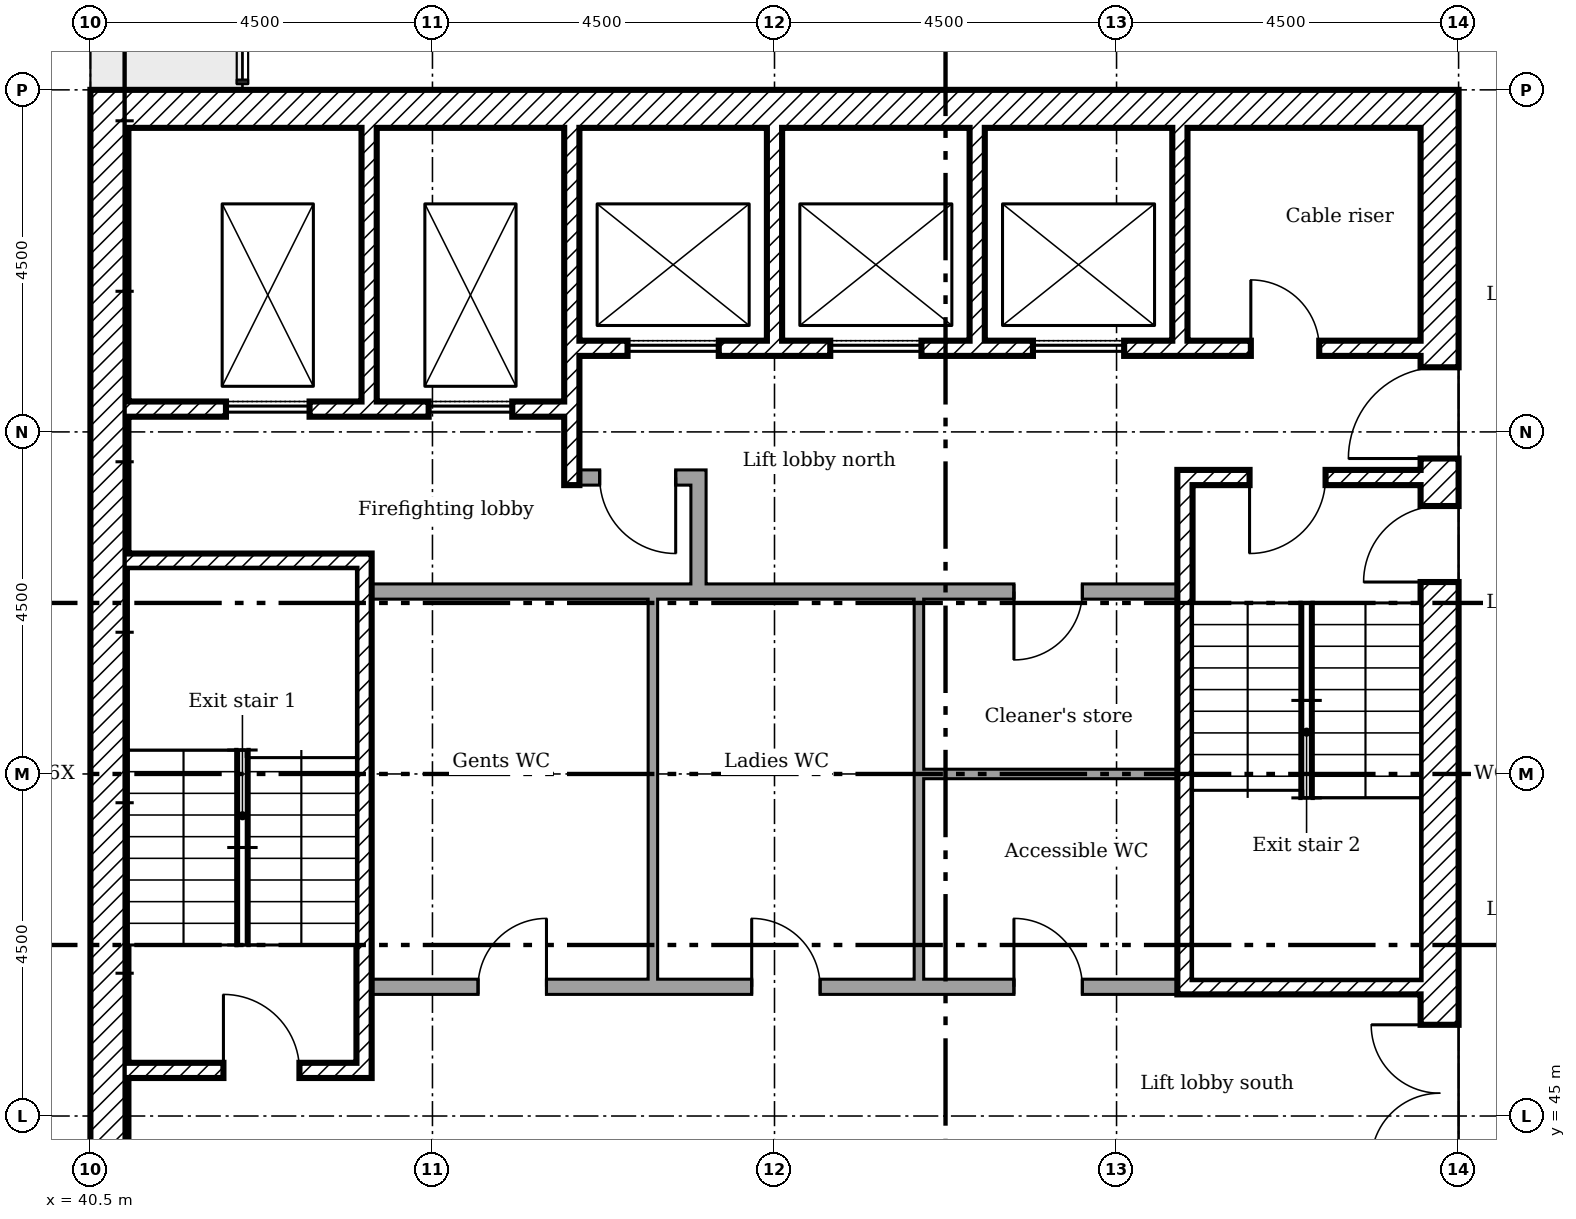
"""IFC4 building model, lengths in metres.
Left out: names, types, materials, properties, quantities, classifications, styles, units other than length and angle.
Written with IfcOpenShell. Run it as: python <this file> out.ifc"""

import sys

from ifc_helpers import new_model, si_unit, direction, frame, frame_2d, origin, place, context, subcontext, project, spatial, rectangle, extrude, element, fill, save


model = new_model("IFC4")
c1 = context("Model", 3, precision=1e-05, world=origin(), true_north=direction((0.0, 1.0)))
c2 = subcontext(c1, "Body", "Model", "MODEL_VIEW")
j1 = project(units=[si_unit("LENGTHUNIT", "METRE"), si_unit("PLANEANGLEUNIT", "RADIAN")], contexts=[c1])
p1 = place(None, origin())
s1 = spatial("IfcSite", under=j1, at=p1, CompositionType="ELEMENT")
p2 = place(p1, origin())
s2 = spatial("IfcBuilding", under=s1, at=p2, CompositionType="ELEMENT")
p3 = place(p2, frame((0.0, 0.0, 213.6)))
s3 = spatial("IfcBuildingStorey", under=s2, at=p3, CompositionType="ELEMENT", Elevation=213.6)
p4 = place(p3, frame((58.25, 40.5, 0.0), z_axis=(0.0, 0.0, 1.0), x_axis=(0.0, 1.0, 0.0)))
e1 = element("IfcWall", 1, at=p4, inside=s3, PredefinedType="SHEAR", context=c2, shape_type="SweptSolid", body=[
    extrude(rectangle(XDim=18.0, YDim=0.5, at=frame_2d((9.0, 0.0))), origin(), (0.0, 0.0, 1.0), 3.35),
])
p5 = place(p4, frame((13.15, 0.0, 0.0)))
e2 = element("IfcOpeningElement", 2, at=p5, cuts=e1, PredefinedType="OPENING", context=c2, shape_type="SweptSolid", body=[
    extrude(rectangle(XDim=1.2, YDim=2.1, at=frame_2d((0.6, 1.05))), frame((0.0, 0.26, 0.0), z_axis=(0.0, -1.0, 0.0), x_axis=(1.0, 0.0, 0.0)), (0.0, 0.0, 1.0), 0.52),
])
p6 = place(p4, frame((3.9, 0.0, 0.0)))
e3 = element("IfcOpeningElement", 3, at=p6, cuts=e1, PredefinedType="OPENING", context=c2, shape_type="SweptSolid", body=[
    extrude(rectangle(XDim=1.8, YDim=2.1, at=frame_2d((0.9, 1.05))), frame((0.0, 0.26, 0.0), z_axis=(0.0, -1.0, 0.0), x_axis=(1.0, 0.0, 0.0)), (0.0, 0.0, 1.0), 0.52),
])
p7 = place(p4, frame((11.525, 0.0, 0.0)))
e4 = element("IfcOpeningElement", 4, at=p7, cuts=e1, PredefinedType="OPENING", context=c2, shape_type="SweptSolid", body=[
    extrude(rectangle(XDim=1.0, YDim=2.1, at=frame_2d((0.5, 1.05))), frame((0.0, 0.26, 0.0), z_axis=(0.0, -1.0, 0.0), x_axis=(1.0, 0.0, 0.0)), (0.0, 0.0, 1.0), 0.52),
])
p8 = place(p3, frame((40.5, 58.25, 0.0)))
e5 = element("IfcWall", 5, at=p8, inside=s3, PredefinedType="SHEAR", context=c2, shape_type="SweptSolid", body=[
    extrude(rectangle(XDim=17.5, YDim=0.5, at=frame_2d((8.75, 0.0))), origin(), (0.0, 0.0, 1.0), 3.35),
])
p9 = place(p3, frame((40.75, 41.0, 0.0), z_axis=(0.0, 0.0, 1.0), x_axis=(0.0, 1.0, 0.0)))
e6 = element("IfcWall", 6, at=p9, inside=s3, PredefinedType="SHEAR", context=c2, shape_type="SweptSolid", body=[
    extrude(rectangle(XDim=17.0, YDim=0.5, at=frame_2d((8.5, 0.0))), origin(), (0.0, 0.0, 1.0), 3.35),
])
p10 = place(p3, frame((44.167, 58.0, 0.0), z_axis=(0.0, 0.0, 1.0), x_axis=(0.0, -1.0, 0.0)))
e7 = element("IfcWall", 7, at=p10, inside=s3, PredefinedType="SHEAR", context=c2, shape_type="SweptSolid", body=[
    extrude(rectangle(XDim=3.6, YDim=0.2, at=frame_2d((1.8, 0.0))), origin(), (0.0, 0.0, 1.0), 3.35),
])
p11 = place(p3, frame((46.833, 58.0, 0.0), z_axis=(0.0, 0.0, 1.0), x_axis=(0.0, -1.0, 0.0)))
e8 = element("IfcWall", 8, at=p11, inside=s3, PredefinedType="SHEAR", context=c2, shape_type="SweptSolid", body=[
    extrude(rectangle(XDim=4.7, YDim=0.2, at=frame_2d((2.35, 0.0))), origin(), (0.0, 0.0, 1.0), 3.35),
])
for number, where, z_axis, x_axis in (
    (9, (49.5, 58.0, 0.0), (0.0, 0.0, 1.0), (0.0, -1.0, 0.0)),
    (10, (52.167, 58.0, 0.0), (0.0, 0.0, 1.0), (0.0, -1.0, 0.0)),
    (11, (54.833, 58.0, 0.0), (0.0, 0.0, 1.0), (0.0, -1.0, 0.0)),
):
    element("IfcWall", number, at=place(p3, frame(where, z_axis=z_axis, x_axis=x_axis)), inside=s3, PredefinedType="SHEAR", context=c2, shape_type="SweptSolid", body=[
        extrude(rectangle(XDim=2.8, YDim=0.2, at=frame_2d((1.4, 0.0))), origin(), (0.0, 0.0, 1.0), 3.35),
    ])
p12 = place(p3, frame((48.5, 51.9, 0.0), z_axis=(0.0, 0.0, 1.0), x_axis=(0.0, 1.0, 0.0)))
e12 = element("IfcWall", 12, at=p12, inside=s3, PredefinedType="PARTITIONING", context=c2, shape_type="SweptSolid", body=[
    extrude(rectangle(XDim=1.6, YDim=0.2, at=frame_2d((0.8, 0.0))), origin(), (0.0, 0.0, 1.0), 3.35),
])
p13 = place(p3, frame((46.933, 53.4, 0.0)))
e13 = element("IfcWall", 13, at=p13, inside=s3, PredefinedType="PARTITIONING", context=c2, shape_type="SweptSolid", body=[
    extrude(rectangle(XDim=1.467, YDim=0.2, at=frame_2d((0.733, 0.0))), origin(), (0.0, 0.0, 1.0), 3.35),
])
p14 = place(p13, frame((0.267, 0.0, 0.0)))
e14 = element("IfcOpeningElement", 14, at=p14, cuts=e13, PredefinedType="OPENING", context=c2, shape_type="SweptSolid", body=[
    extrude(rectangle(XDim=1.0, YDim=2.1, at=frame_2d((0.5, 1.05))), frame((0.0, 0.11, 0.0), z_axis=(0.0, -1.0, 0.0), x_axis=(1.0, 0.0, 0.0)), (0.0, 0.0, 1.0), 0.22),
])
p15 = place(p3, frame((46.933, 55.1, 0.0)))
e15 = element("IfcWall", 15, at=p15, inside=s3, PredefinedType="SHEAR", context=c2, shape_type="SweptSolid", body=[
    extrude(rectangle(XDim=11.067, YDim=0.2, at=frame_2d((5.533, 0.0))), origin(), (0.0, 0.0, 1.0), 3.35),
])
p16 = place(p15, frame((8.833, 0.0, 0.0)))
e16 = element("IfcOpeningElement", 16, at=p16, cuts=e15, PredefinedType="OPENING", context=c2, shape_type="SweptSolid", body=[
    extrude(rectangle(XDim=0.9, YDim=2.1, at=frame_2d((0.45, 1.05))), frame((0.0, 0.11, 0.0), z_axis=(0.0, -1.0, 0.0), x_axis=(1.0, 0.0, 0.0)), (0.0, 0.0, 1.0), 0.22),
])
p17 = place(p15, frame((0.633, 0.0, 0.0)))
e17 = element("IfcOpeningElement", 17, at=p17, cuts=e15, PredefinedType="OPENING", context=c2, shape_type="SweptSolid", body=[
    extrude(rectangle(XDim=1.2, YDim=2.1, at=frame_2d((0.6, 1.05))), frame((0.0, 0.11, 0.0), z_axis=(0.0, -1.0, 0.0), x_axis=(1.0, 0.0, 0.0)), (0.0, 0.0, 1.0), 0.22),
])
p18 = place(p15, frame((3.3, 0.0, 0.0)))
e18 = element("IfcOpeningElement", 18, at=p18, cuts=e15, PredefinedType="OPENING", context=c2, shape_type="SweptSolid", body=[
    extrude(rectangle(XDim=1.2, YDim=2.1, at=frame_2d((0.6, 1.05))), frame((0.0, 0.11, 0.0), z_axis=(0.0, -1.0, 0.0), x_axis=(1.0, 0.0, 0.0)), (0.0, 0.0, 1.0), 0.22),
])
p19 = place(p15, frame((5.967, 0.0, 0.0)))
e19 = element("IfcOpeningElement", 19, at=p19, cuts=e15, PredefinedType="OPENING", context=c2, shape_type="SweptSolid", body=[
    extrude(rectangle(XDim=1.2, YDim=2.1, at=frame_2d((0.6, 1.05))), frame((0.0, 0.11, 0.0), z_axis=(0.0, -1.0, 0.0), x_axis=(1.0, 0.0, 0.0)), (0.0, 0.0, 1.0), 0.22),
])
p20 = place(p3, frame((41.0, 54.3, 0.0)))
e20 = element("IfcWall", 20, at=p20, inside=s3, PredefinedType="SHEAR", context=c2, shape_type="SweptSolid", body=[
    extrude(rectangle(XDim=5.733, YDim=0.2, at=frame_2d((2.867, 0.0))), origin(), (0.0, 0.0, 1.0), 3.35),
])
p21 = place(p20, frame((1.283, 0.0, 0.0)))
e21 = element("IfcOpeningElement", 21, at=p21, cuts=e20, PredefinedType="OPENING", context=c2, shape_type="SweptSolid", body=[
    extrude(rectangle(XDim=1.1, YDim=2.1, at=frame_2d((0.55, 1.05))), frame((0.0, 0.11, 0.0), z_axis=(0.0, -1.0, 0.0), x_axis=(1.0, 0.0, 0.0)), (0.0, 0.0, 1.0), 0.22),
])
p22 = place(p20, frame((3.95, 0.0, 0.0)))
e22 = element("IfcOpeningElement", 22, at=p22, cuts=e20, PredefinedType="OPENING", context=c2, shape_type="SweptSolid", body=[
    extrude(rectangle(XDim=1.1, YDim=2.1, at=frame_2d((0.55, 1.05))), frame((0.0, 0.11, 0.0), z_axis=(0.0, -1.0, 0.0), x_axis=(1.0, 0.0, 0.0)), (0.0, 0.0, 1.0), 0.22),
])
p23 = place(p3, frame((44.1, 45.5, 0.0), z_axis=(0.0, 0.0, 1.0), x_axis=(0.0, 1.0, 0.0)))
e23 = element("IfcWall", 23, at=p23, inside=s3, PredefinedType="SHEAR", context=c2, shape_type="SweptSolid", body=[
    extrude(rectangle(XDim=6.9, YDim=0.2, at=frame_2d((3.45, 0.0))), origin(), (0.0, 0.0, 1.0), 3.35),
])
p24 = place(p3, frame((41.0, 52.3, 0.0)))
e24 = element("IfcWall", 24, at=p24, inside=s3, PredefinedType="SHEAR", context=c2, shape_type="SweptSolid", body=[
    extrude(rectangle(XDim=3.0, YDim=0.2, at=frame_2d((1.5, 0.0))), origin(), (0.0, 0.0, 1.0), 3.35),
])
p25 = place(p3, frame((41.0, 45.6, 0.0)))
e25 = element("IfcWall", 25, at=p25, inside=s3, PredefinedType="SHEAR", context=c2, shape_type="SweptSolid", body=[
    extrude(rectangle(XDim=3.0, YDim=0.2, at=frame_2d((1.5, 0.0))), origin(), (0.0, 0.0, 1.0), 3.35),
])
p26 = place(p25, frame((1.25, 0.0, 0.0)))
e26 = element("IfcOpeningElement", 26, at=p26, cuts=e25, PredefinedType="OPENING", context=c2, shape_type="SweptSolid", body=[
    extrude(rectangle(XDim=1.0, YDim=2.1, at=frame_2d((0.5, 1.05))), frame((0.0, 0.11, 0.0), z_axis=(0.0, -1.0, 0.0), x_axis=(1.0, 0.0, 0.0)), (0.0, 0.0, 1.0), 0.22),
])
p27 = place(p3, frame((54.8, 53.4, 0.0)))
e27 = element("IfcWall", 27, at=p27, inside=s3, PredefinedType="SHEAR", context=c2, shape_type="SweptSolid", body=[
    extrude(rectangle(XDim=3.2, YDim=0.2, at=frame_2d((1.6, 0.0))), origin(), (0.0, 0.0, 1.0), 3.35),
])
p28 = place(p27, frame((0.95, 0.0, 0.0)))
e28 = element("IfcOpeningElement", 28, at=p28, cuts=e27, PredefinedType="OPENING", context=c2, shape_type="SweptSolid", body=[
    extrude(rectangle(XDim=1.0, YDim=2.1, at=frame_2d((0.5, 1.05))), frame((0.0, 0.11, 0.0), z_axis=(0.0, -1.0, 0.0), x_axis=(1.0, 0.0, 0.0)), (0.0, 0.0, 1.0), 0.22),
])
p29 = place(p3, frame((54.8, 46.7, 0.0)))
e29 = element("IfcWall", 29, at=p29, inside=s3, PredefinedType="SHEAR", context=c2, shape_type="SweptSolid", body=[
    extrude(rectangle(XDim=3.2, YDim=0.2, at=frame_2d((1.6, 0.0))), origin(), (0.0, 0.0, 1.0), 3.35),
])
p30 = place(p3, frame((54.9, 46.8, 0.0), z_axis=(0.0, 0.0, 1.0), x_axis=(0.0, 1.0, 0.0)))
e30 = element("IfcWall", 30, at=p30, inside=s3, PredefinedType="SHEAR", context=c2, shape_type="SweptSolid", body=[
    extrude(rectangle(XDim=6.5, YDim=0.2, at=frame_2d((3.25, 0.0))), origin(), (0.0, 0.0, 1.0), 3.35),
])
p31 = place(p3, frame((44.2, 51.9, 0.0)))
e31 = element("IfcWall", 31, at=p31, inside=s3, PredefinedType="PARTITIONING", context=c2, shape_type="SweptSolid", body=[
    extrude(rectangle(XDim=10.6, YDim=0.2, at=frame_2d((5.3, 0.0))), origin(), (0.0, 0.0, 1.0), 3.35),
])
p32 = place(p31, frame((8.45, 0.0, 0.0)))
e32 = element("IfcOpeningElement", 32, at=p32, cuts=e31, PredefinedType="OPENING", context=c2, shape_type="SweptSolid", body=[
    extrude(rectangle(XDim=0.9, YDim=2.1, at=frame_2d((0.45, 1.05))), frame((0.0, 0.11, 0.0), z_axis=(0.0, -1.0, 0.0), x_axis=(1.0, 0.0, 0.0)), (0.0, 0.0, 1.0), 0.22),
])
p33 = place(p3, frame((44.2, 46.7, 0.0)))
e33 = element("IfcWall", 33, at=p33, inside=s3, PredefinedType="PARTITIONING", context=c2, shape_type="SweptSolid", body=[
    extrude(rectangle(XDim=10.6, YDim=0.2, at=frame_2d((5.3, 0.0))), origin(), (0.0, 0.0, 1.0), 3.35),
])
p34 = place(p33, frame((1.4, 0.0, 0.0)))
e34 = element("IfcOpeningElement", 34, at=p34, cuts=e33, PredefinedType="OPENING", context=c2, shape_type="SweptSolid", body=[
    extrude(rectangle(XDim=0.9, YDim=2.1, at=frame_2d((0.45, 1.05))), frame((0.0, 0.11, 0.0), z_axis=(0.0, -1.0, 0.0), x_axis=(1.0, 0.0, 0.0)), (0.0, 0.0, 1.0), 0.22),
])
p35 = place(p33, frame((5.0, 0.0, 0.0)))
e35 = element("IfcOpeningElement", 35, at=p35, cuts=e33, PredefinedType="OPENING", context=c2, shape_type="SweptSolid", body=[
    extrude(rectangle(XDim=0.9, YDim=2.1, at=frame_2d((0.45, 1.05))), frame((0.0, 0.11, 0.0), z_axis=(0.0, -1.0, 0.0), x_axis=(1.0, 0.0, 0.0)), (0.0, 0.0, 1.0), 0.22),
])
p36 = place(p33, frame((8.45, 0.0, 0.0)))
e36 = element("IfcOpeningElement", 36, at=p36, cuts=e33, PredefinedType="OPENING", context=c2, shape_type="SweptSolid", body=[
    extrude(rectangle(XDim=0.9, YDim=2.1, at=frame_2d((0.45, 1.05))), frame((0.0, 0.11, 0.0), z_axis=(0.0, -1.0, 0.0), x_axis=(1.0, 0.0, 0.0)), (0.0, 0.0, 1.0), 0.22),
])
p37 = place(p3, frame((47.9, 46.8, 0.0), z_axis=(0.0, 0.0, 1.0), x_axis=(0.0, 1.0, 0.0)))
e37 = element("IfcWall", 37, at=p37, inside=s3, PredefinedType="PARTITIONING", context=c2, shape_type="SweptSolid", body=[
    extrude(rectangle(XDim=5.0, YDim=0.125, at=frame_2d((2.5, 0.0))), origin(), (0.0, 0.0, 1.0), 3.35),
])
p38 = place(p3, frame((51.4, 46.8, 0.0), z_axis=(0.0, 0.0, 1.0), x_axis=(0.0, 1.0, 0.0)))
e38 = element("IfcWall", 38, at=p38, inside=s3, PredefinedType="PARTITIONING", context=c2, shape_type="SweptSolid", body=[
    extrude(rectangle(XDim=2.762, YDim=0.125, at=frame_2d((1.381, 0.0))), origin(), (0.0, 0.0, 1.0), 3.35),
])
p39 = place(p3, frame((54.8, 49.5, 0.0), z_axis=(0.0, 0.0, 1.0), x_axis=(-1.0, 0.0, 0.0)))
e39 = element("IfcWall", 39, at=p39, inside=s3, PredefinedType="PARTITIONING", context=c2, shape_type="SweptSolid", body=[
    extrude(rectangle(XDim=3.338, YDim=0.125, at=frame_2d((1.669, 0.0))), origin(), (0.0, 0.0, 1.0), 3.35),
])
p40 = place(p3, frame((51.4, 49.5, 0.0), z_axis=(0.0, 0.0, 1.0), x_axis=(0.0, 1.0, 0.0)))
e40 = element("IfcWall", 40, at=p40, inside=s3, PredefinedType="PARTITIONING", context=c2, shape_type="SweptSolid", body=[
    extrude(rectangle(XDim=2.3, YDim=0.125, at=frame_2d((1.15, 0.0))), origin(), (0.0, 0.0, 1.0), 3.35),
])
p41 = place(p5, origin())
e41 = element("IfcDoor", 41, at=p41, inside=s3, OperationType="SINGLE_SWING_RIGHT", PredefinedType="DOOR", context=c2, shape_type="SweptSolid", body=[
    extrude(rectangle(XDim=1.2, YDim=2.1, at=frame_2d((0.6, 1.05))), frame((0.0, 0.025, 0.0), z_axis=(0.0, -1.0, 0.0), x_axis=(1.0, 0.0, 0.0)), (0.0, 0.0, 1.0), 0.05),
])
fill(e2, e41)
p42 = place(p6, origin())
e42 = element("IfcDoor", 42, at=p42, inside=s3, OperationType="DOUBLE_DOOR_SINGLE_SWING", PredefinedType="DOOR", context=c2, shape_type="SweptSolid", body=[
    extrude(rectangle(XDim=1.8, YDim=2.1, at=frame_2d((0.9, 1.05))), frame((0.0, 0.025, 0.0), z_axis=(0.0, -1.0, 0.0), x_axis=(1.0, 0.0, 0.0)), (0.0, 0.0, 1.0), 0.05),
])
fill(e3, e42)
p43 = place(p26, origin())
e43 = element("IfcDoor", 43, at=p43, inside=s3, OperationType="SINGLE_SWING_RIGHT", PredefinedType="DOOR", context=c2, shape_type="SweptSolid", body=[
    extrude(rectangle(XDim=1.0, YDim=2.1, at=frame_2d((0.5, 1.05))), frame((0.0, 0.025, 0.0), z_axis=(0.0, -1.0, 0.0), x_axis=(1.0, 0.0, 0.0)), (0.0, 0.0, 1.0), 0.05),
])
fill(e26, e43)
p44 = place(p28, frame((1.0, 0.0, 0.0), x_axis=(-1.0, 0.0, 0.0)))
e44 = element("IfcDoor", 44, at=p44, inside=s3, OperationType="SINGLE_SWING_LEFT", PredefinedType="DOOR", context=c2, shape_type="SweptSolid", body=[
    extrude(rectangle(XDim=1.0, YDim=2.1, at=frame_2d((0.5, 1.05))), frame((0.0, 0.025, 0.0), z_axis=(0.0, -1.0, 0.0), x_axis=(1.0, 0.0, 0.0)), (0.0, 0.0, 1.0), 0.05),
])
fill(e28, e44)
p45 = place(p7, origin())
e45 = element("IfcDoor", 45, at=p45, inside=s3, OperationType="SINGLE_SWING_RIGHT", PredefinedType="DOOR", context=c2, shape_type="SweptSolid", body=[
    extrude(rectangle(XDim=1.0, YDim=2.1, at=frame_2d((0.5, 1.05))), frame((0.0, 0.025, 0.0), z_axis=(0.0, -1.0, 0.0), x_axis=(1.0, 0.0, 0.0)), (0.0, 0.0, 1.0), 0.05),
])
fill(e4, e45)
p46 = place(p14, frame((1.0, 0.0, 0.0), x_axis=(-1.0, 0.0, 0.0)))
e46 = element("IfcDoor", 46, at=p46, inside=s3, OperationType="SINGLE_SWING_RIGHT", PredefinedType="DOOR", context=c2, shape_type="SweptSolid", body=[
    extrude(rectangle(XDim=1.0, YDim=2.1, at=frame_2d((0.5, 1.05))), frame((0.0, 0.025, 0.0), z_axis=(0.0, -1.0, 0.0), x_axis=(1.0, 0.0, 0.0)), (0.0, 0.0, 1.0), 0.05),
])
fill(e14, e46)
p47 = place(p16, origin())
e47 = element("IfcDoor", 47, at=p47, inside=s3, OperationType="SINGLE_SWING_RIGHT", PredefinedType="DOOR", context=c2, shape_type="SweptSolid", body=[
    extrude(rectangle(XDim=0.9, YDim=2.1, at=frame_2d((0.45, 1.05))), frame((0.0, 0.025, 0.0), z_axis=(0.0, -1.0, 0.0), x_axis=(1.0, 0.0, 0.0)), (0.0, 0.0, 1.0), 0.05),
])
fill(e16, e47)
p48 = place(p34, origin())
e48 = element("IfcDoor", 48, at=p48, inside=s3, OperationType="SINGLE_SWING_LEFT", PredefinedType="DOOR", context=c2, shape_type="SweptSolid", body=[
    extrude(rectangle(XDim=0.9, YDim=2.1, at=frame_2d((0.45, 1.05))), frame((0.0, 0.025, 0.0), z_axis=(0.0, -1.0, 0.0), x_axis=(1.0, 0.0, 0.0)), (0.0, 0.0, 1.0), 0.05),
])
fill(e34, e48)
p49 = place(p35, origin())
e49 = element("IfcDoor", 49, at=p49, inside=s3, OperationType="SINGLE_SWING_RIGHT", PredefinedType="DOOR", context=c2, shape_type="SweptSolid", body=[
    extrude(rectangle(XDim=0.9, YDim=2.1, at=frame_2d((0.45, 1.05))), frame((0.0, 0.025, 0.0), z_axis=(0.0, -1.0, 0.0), x_axis=(1.0, 0.0, 0.0)), (0.0, 0.0, 1.0), 0.05),
])
fill(e35, e49)
p50 = place(p36, origin())
e50 = element("IfcDoor", 50, at=p50, inside=s3, OperationType="SINGLE_SWING_RIGHT", PredefinedType="DOOR", context=c2, shape_type="SweptSolid", body=[
    extrude(rectangle(XDim=0.9, YDim=2.1, at=frame_2d((0.45, 1.05))), frame((0.0, 0.025, 0.0), z_axis=(0.0, -1.0, 0.0), x_axis=(1.0, 0.0, 0.0)), (0.0, 0.0, 1.0), 0.05),
])
fill(e36, e50)
p51 = place(p32, frame((0.9, 0.0, 0.0), x_axis=(-1.0, 0.0, 0.0)))
e51 = element("IfcDoor", 51, at=p51, inside=s3, OperationType="SINGLE_SWING_LEFT", PredefinedType="DOOR", context=c2, shape_type="SweptSolid", body=[
    extrude(rectangle(XDim=0.9, YDim=2.1, at=frame_2d((0.45, 1.05))), frame((0.0, 0.025, 0.0), z_axis=(0.0, -1.0, 0.0), x_axis=(1.0, 0.0, 0.0)), (0.0, 0.0, 1.0), 0.05),
])
fill(e32, e51)
p52 = place(p21, origin())
e52 = element("IfcDoor", 52, at=p52, inside=s3, OperationType="SLIDING_TO_LEFT", PredefinedType="DOOR", context=c2, shape_type="SweptSolid", body=[
    extrude(rectangle(XDim=1.1, YDim=2.1, at=frame_2d((0.55, 1.05))), frame((0.0, 0.025, 0.0), z_axis=(0.0, -1.0, 0.0), x_axis=(1.0, 0.0, 0.0)), (0.0, 0.0, 1.0), 0.05),
])
fill(e21, e52)
p53 = place(p22, origin())
e53 = element("IfcDoor", 53, at=p53, inside=s3, OperationType="SLIDING_TO_LEFT", PredefinedType="DOOR", context=c2, shape_type="SweptSolid", body=[
    extrude(rectangle(XDim=1.1, YDim=2.1, at=frame_2d((0.55, 1.05))), frame((0.0, 0.025, 0.0), z_axis=(0.0, -1.0, 0.0), x_axis=(1.0, 0.0, 0.0)), (0.0, 0.0, 1.0), 0.05),
])
fill(e22, e53)
p54 = place(p17, origin())
e54 = element("IfcDoor", 54, at=p54, inside=s3, OperationType="SLIDING_TO_LEFT", PredefinedType="DOOR", context=c2, shape_type="SweptSolid", body=[
    extrude(rectangle(XDim=1.2, YDim=2.1, at=frame_2d((0.6, 1.05))), frame((0.0, 0.025, 0.0), z_axis=(0.0, -1.0, 0.0), x_axis=(1.0, 0.0, 0.0)), (0.0, 0.0, 1.0), 0.05),
])
fill(e17, e54)
p55 = place(p18, origin())
e55 = element("IfcDoor", 55, at=p55, inside=s3, OperationType="SLIDING_TO_LEFT", PredefinedType="DOOR", context=c2, shape_type="SweptSolid", body=[
    extrude(rectangle(XDim=1.2, YDim=2.1, at=frame_2d((0.6, 1.05))), frame((0.0, 0.025, 0.0), z_axis=(0.0, -1.0, 0.0), x_axis=(1.0, 0.0, 0.0)), (0.0, 0.0, 1.0), 0.05),
])
fill(e18, e55)
p56 = place(p19, origin())
e56 = element("IfcDoor", 56, at=p56, inside=s3, OperationType="SLIDING_TO_LEFT", PredefinedType="DOOR", context=c2, shape_type="SweptSolid", body=[
    extrude(rectangle(XDim=1.2, YDim=2.1, at=frame_2d((0.6, 1.05))), frame((0.0, 0.025, 0.0), z_axis=(0.0, -1.0, 0.0), x_axis=(1.0, 0.0, 0.0)), (0.0, 0.0, 1.0), 0.05),
])
fill(e19, e56)
save(model, sys.argv[1])
